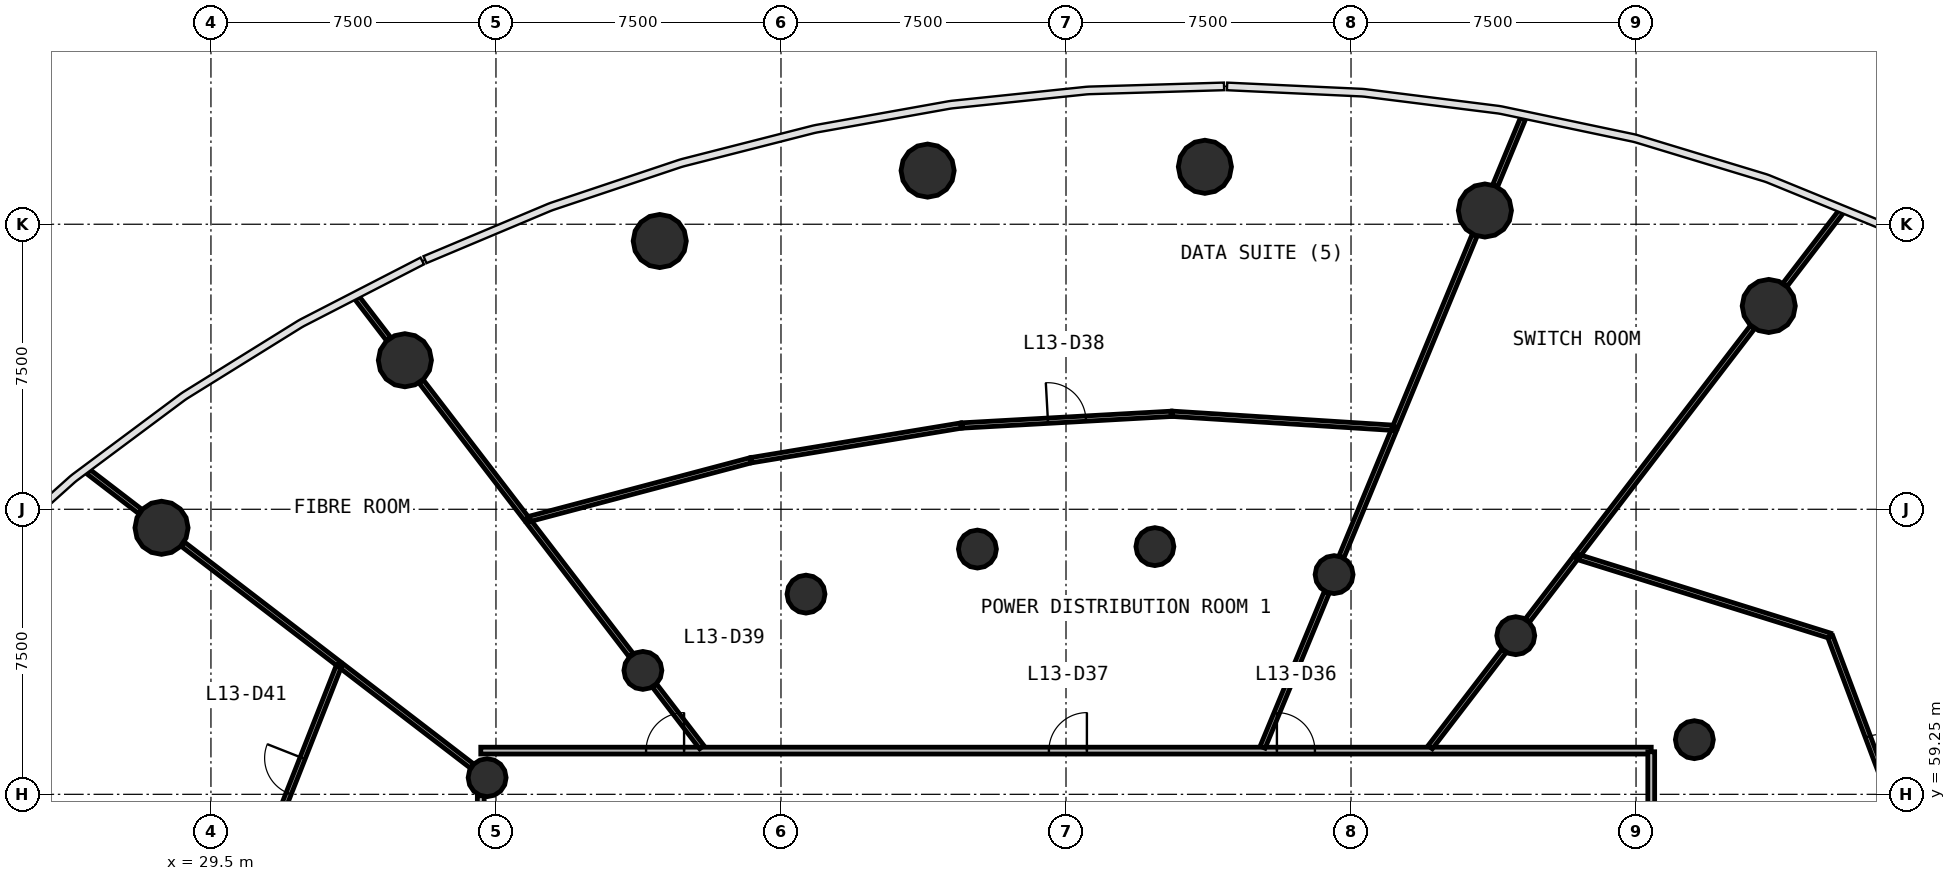
"""IFC4 building model, lengths in metres.
Left out: names, types, materials, properties, quantities, classifications, styles, units other than length and angle.
Written with IfcOpenShell. Run it as: python <this file> out.ifc"""

import sys

from ifc_helpers import new_model, si_unit, direction, frame, frame_2d, origin, origin_2d, place, context, subcontext, project, spatial, rectangle, circle, extrude, source, transform, mapped, element, fill, save


model = new_model("IFC4")
c1 = context("Model", 3, precision=1e-05, world=origin(), true_north=direction((0.0, 1.0)))
c2 = subcontext(c1, "Body", "Model", "MODEL_VIEW")
j1 = project(units=[si_unit("LENGTHUNIT", "METRE"), si_unit("PLANEANGLEUNIT", "RADIAN")], contexts=[c1])
p1 = place(None, origin())
s1 = spatial("IfcSite", under=j1, at=p1, CompositionType="ELEMENT")
p2 = place(p1, origin())
s2 = spatial("IfcBuilding", under=s1, at=p2, CompositionType="ELEMENT")
p3 = place(p2, frame((0.0, 0.0, 57.8)))
s3 = spatial("IfcBuildingStorey", under=s2, at=p3, CompositionType="ELEMENT", Elevation=57.8)
m1 = source(origin(), c2, "Body", "SweptSolid", [
    extrude(circle(Radius=0.7, at=origin_2d()), origin(), (0.0, 0.0, 1.0), 4.4),
])
for number, where, z_axis, x_axis in (
    (1, (70.492, 72.1, 0.0), (0.0, 0.0, 1.0), (1.0, 0.0, 0.0)),
    (2, (63.023, 74.611, 0.0), (0.0, 0.0, 1.0), (1.0, 0.0, 0.0)),
    (3, (55.655, 75.761, 0.0), (0.0, 0.0, 1.0), (1.0, 0.0, 0.0)),
    (4, (48.358, 75.661, 0.0), (0.0, 0.0, 1.0), (1.0, 0.0, 0.0)),
    (5, (41.31, 73.809, 0.0), (0.0, 0.0, 1.0), (1.0, 0.0, 0.0)),
    (6, (34.604, 70.672, 0.0), (0.0, 0.0, 1.0), (1.0, 0.0, 0.0)),
    (7, (28.199, 66.263, 0.0), (0.0, 0.0, 1.0), (1.0, 0.0, 0.0)),
):
    element("IfcColumn", number, at=place(p3, frame(where, z_axis=z_axis, x_axis=x_axis)), inside=s3, PredefinedType="COLUMN", context=c2, shape_type="MappedRepresentation", body=[
        mapped(m1, transform((0.0, 0.0, 0.0), scale=1.0)),
    ])
m2 = source(origin(), c2, "Body", "SweptSolid", [
    extrude(circle(Radius=0.5, at=origin_2d()), origin(), (0.0, 0.0, 1.0), 4.4),
])
for number, where, z_axis, x_axis in (
    (8, (68.535, 60.688, 0.0), (0.0, 0.0, 1.0), (1.0, 0.0, 0.0)),
    (9, (63.835, 63.424, 0.0), (0.0, 0.0, 1.0), (1.0, 0.0, 0.0)),
    (10, (59.055, 65.031, 0.0), (0.0, 0.0, 1.0), (1.0, 0.0, 0.0)),
    (11, (54.339, 65.767, 0.0), (0.0, 0.0, 1.0), (1.0, 0.0, 0.0)),
    (12, (49.669, 65.703, 0.0), (0.0, 0.0, 1.0), (1.0, 0.0, 0.0)),
    (13, (45.158, 64.518, 0.0), (0.0, 0.0, 1.0), (1.0, 0.0, 0.0)),
    (14, (40.866, 62.51, 0.0), (0.0, 0.0, 1.0), (1.0, 0.0, 0.0)),
    (15, (36.768, 59.688, 0.0), (0.0, 0.0, 1.0), (1.0, 0.0, 0.0)),
):
    element("IfcColumn", number, at=place(p3, frame(where, z_axis=z_axis, x_axis=x_axis)), inside=s3, PredefinedType="COLUMN", context=c2, shape_type="MappedRepresentation", body=[
        mapped(m2, transform((0.0, 0.0, 0.0), scale=1.0)),
    ])
p4 = place(p3, frame((36.6, 60.4, 0.0), z_axis=(0.0, 0.0, 1.0), x_axis=(1.0, 0.0, 0.0)))
e16 = element("IfcWall", 16, at=p4, inside=s3, PredefinedType="PARTITIONING", context=c2, shape_type="SweptSolid", body=[
    extrude(rectangle(XDim=30.8, YDim=0.18, at=frame_2d((15.4, 0.0))), origin(), (0.0, 0.0, 1.0), 3.05),
])
p5 = place(p4, frame((20.95, 0.0, 0.0)))
e17 = element("IfcOpeningElement", 17, at=p5, cuts=e16, PredefinedType="OPENING", context=c2, shape_type="SweptSolid", body=[
    extrude(rectangle(XDim=1.0, YDim=2.1, at=frame_2d((0.5, 1.05))), frame((0.0, 0.1, 0.0), z_axis=(0.0, -1.0, 0.0), x_axis=(1.0, 0.0, 0.0)), (0.0, 0.0, 1.0), 0.2),
])
p6 = place(p4, frame((14.95, 0.0, 0.0)))
e18 = element("IfcOpeningElement", 18, at=p6, cuts=e16, PredefinedType="OPENING", context=c2, shape_type="SweptSolid", body=[
    extrude(rectangle(XDim=1.0, YDim=2.1, at=frame_2d((0.5, 1.05))), frame((0.0, 0.1, 0.0), z_axis=(0.0, -1.0, 0.0), x_axis=(1.0, 0.0, 0.0)), (0.0, 0.0, 1.0), 0.2),
])
p7 = place(p4, frame((4.35, 0.0, 0.0)))
e19 = element("IfcOpeningElement", 19, at=p7, cuts=e16, PredefinedType="OPENING", context=c2, shape_type="SweptSolid", body=[
    extrude(rectangle(XDim=1.0, YDim=2.1, at=frame_2d((0.5, 1.05))), frame((0.0, 0.1, 0.0), z_axis=(0.0, -1.0, 0.0), x_axis=(1.0, 0.0, 0.0)), (0.0, 0.0, 1.0), 0.2),
])
p8 = place(p3, frame((67.4, 60.37, 0.0), z_axis=(0.0, 0.0, 1.0), x_axis=(0.0, -1.0, 0.0)))
e20 = element("IfcWall", 20, at=p8, inside=s3, PredefinedType="PARTITIONING", context=c2, shape_type="SweptSolid", body=[
    extrude(rectangle(XDim=23.583, YDim=0.18, at=frame_2d((11.791, 0.0))), origin(), (0.0, 0.0, 1.0), 3.05),
])
p9 = place(p8, frame((11.333, 0.0, 0.0)))
e21 = element("IfcOpeningElement", 21, at=p9, cuts=e20, PredefinedType="OPENING", context=c2, shape_type="SweptSolid", body=[
    extrude(rectangle(XDim=1.0, YDim=2.1, at=frame_2d((0.5, 1.05))), frame((0.0, 0.1, 0.0), z_axis=(0.0, -1.0, 0.0), x_axis=(1.0, 0.0, 0.0)), (0.0, 0.0, 1.0), 0.2),
])
p10 = place(p8, frame((4.532, 0.0, 0.0)))
e22 = element("IfcOpeningElement", 22, at=p10, cuts=e20, PredefinedType="OPENING", context=c2, shape_type="SweptSolid", body=[
    extrude(rectangle(XDim=1.0, YDim=2.1, at=frame_2d((0.5, 1.05))), frame((0.0, 0.1, 0.0), z_axis=(0.0, -1.0, 0.0), x_axis=(1.0, 0.0, 0.0)), (0.0, 0.0, 1.0), 0.2),
])
p11 = place(p3, frame((36.6, 35.63, 0.0), z_axis=(0.0, 0.0, 1.0), x_axis=(0.0, 1.0, 0.0)))
e23 = element("IfcWall", 23, at=p11, inside=s3, PredefinedType="PARTITIONING", context=c2, shape_type="SweptSolid", body=[
    extrude(rectangle(XDim=23.583, YDim=0.18, at=frame_2d((11.791, 0.0))), origin(), (0.0, 0.0, 1.0), 3.05),
])
p12 = place(p11, frame((11.333, 0.0, 0.0)))
e24 = element("IfcOpeningElement", 24, at=p12, cuts=e23, PredefinedType="OPENING", context=c2, shape_type="SweptSolid", body=[
    extrude(rectangle(XDim=1.0, YDim=2.1, at=frame_2d((0.5, 1.05))), frame((0.0, 0.1, 0.0), z_axis=(0.0, -1.0, 0.0), x_axis=(1.0, 0.0, 0.0)), (0.0, 0.0, 1.0), 0.2),
])
p13 = place(p11, frame((9.133, 0.0, 0.0)))
e25 = element("IfcOpeningElement", 25, at=p13, cuts=e23, PredefinedType="OPENING", context=c2, shape_type="SweptSolid", body=[
    extrude(rectangle(XDim=1.0, YDim=2.1, at=frame_2d((0.5, 1.05))), frame((0.0, 0.1, 0.0), z_axis=(0.0, -1.0, 0.0), x_axis=(1.0, 0.0, 0.0)), (0.0, 0.0, 1.0), 0.2),
])
p14 = place(p3, frame((65.433, 65.507, 0.0), z_axis=(0.0, 0.0, 1.0), x_axis=(0.608761001487, 0.79335366834, 0.0)))
e26 = element("IfcWall", 26, at=p14, inside=s3, PredefinedType="PARTITIONING", context=c2, shape_type="SweptSolid", body=[
    extrude(rectangle(XDim=7.606, YDim=0.14, at=frame_2d((3.803, 0.0))), origin(), (0.0, 0.0, 1.0), 3.05),
])
p15 = place(p3, frame((72.101, 63.424, 0.0), z_axis=(0.0, 0.0, 1.0), x_axis=(-0.954540929829, 0.298079877351, 0.0)))
e27 = element("IfcWall", 27, at=p15, inside=s3, PredefinedType="PARTITIONING", context=c2, shape_type="SweptSolid", body=[
    extrude(rectangle(XDim=6.911, YDim=0.14, at=frame_2d((3.456, 0.0))), origin(), (0.0, 0.0, 1.0), 3.05),
])
p16 = place(p3, frame((72.112, 63.396, 0.0), z_axis=(0.0, 0.0, 1.0), x_axis=(0.351475385959, -0.936197122974, 0.0)))
e28 = element("IfcWall", 28, at=p16, inside=s3, PredefinedType="PARTITIONING", context=c2, shape_type="SweptSolid", body=[
    extrude(rectangle(XDim=6.461, YDim=0.14, at=frame_2d((3.231, 0.0))), origin(), (0.0, 0.0, 1.0), 3.05),
])
p17 = place(p16, frame((2.811, 0.0, 0.0)))
e29 = element("IfcOpeningElement", 29, at=p17, cuts=e28, PredefinedType="OPENING", context=c2, shape_type="SweptSolid", body=[
    extrude(rectangle(XDim=1.0, YDim=2.1, at=frame_2d((0.5, 1.05))), frame((0.0, 0.08, 0.0), z_axis=(0.0, -1.0, 0.0), x_axis=(1.0, 0.0, 0.0)), (0.0, 0.0, 1.0), 0.16),
])
p18 = place(p3, frame((30.597, 56.865, 0.0), z_axis=(0.0, 0.0, 1.0), x_axis=(0.36659433638, 0.930380885731, 0.0)))
e30 = element("IfcWall", 30, at=p18, inside=s3, PredefinedType="PARTITIONING", context=c2, shape_type="SweptSolid", body=[
    extrude(rectangle(XDim=6.238, YDim=0.14, at=frame_2d((3.119, 0.0))), origin(), (0.0, 0.0, 1.0), 3.05),
])
p19 = place(p18, frame((2.587, 0.0, 0.0)))
e31 = element("IfcOpeningElement", 31, at=p19, cuts=e30, PredefinedType="OPENING", context=c2, shape_type="SweptSolid", body=[
    extrude(rectangle(XDim=1.0, YDim=2.1, at=frame_2d((0.5, 1.05))), frame((0.0, 0.08, 0.0), z_axis=(0.0, -1.0, 0.0), x_axis=(1.0, 0.0, 0.0)), (0.0, 0.0, 1.0), 0.16),
])
p20 = place(p3, frame((43.7, 68.038, 0.0), z_axis=(0.0, 0.0, 1.0), x_axis=(-0.966620202726, -0.256213550932, 0.0)))
e32 = element("IfcWall", 32, at=p20, inside=s3, PredefinedType="PARTITIONING", context=c2, shape_type="SweptSolid", body=[
    extrude(rectangle(XDim=6.083, YDim=0.14, at=frame_2d((3.042, 0.0))), origin(), (0.0, 0.0, 1.0), 3.05),
])
p21 = place(p3, frame((60.654, 68.891, 0.0), z_axis=(0.0, 0.0, 1.0), x_axis=(-0.997994335937, 0.063303281411, 0.0)))
e33 = element("IfcWall", 33, at=p21, inside=s3, PredefinedType="PARTITIONING", context=c2, shape_type="SweptSolid", body=[
    extrude(rectangle(XDim=5.866, YDim=0.14, at=frame_2d((2.933, 0.0))), origin(), (0.0, 0.0, 1.0), 3.05),
])
p22 = place(p3, frame((49.241, 68.953, 0.0), z_axis=(0.0, 0.0, 1.0), x_axis=(-0.986639663996, -0.162917689125, 0.0)))
e34 = element("IfcWall", 34, at=p22, inside=s3, PredefinedType="PARTITIONING", context=c2, shape_type="SweptSolid", body=[
    extrude(rectangle(XDim=5.587, YDim=0.14, at=frame_2d((2.793, 0.0))), origin(), (0.0, 0.0, 1.0), 3.05),
])
p23 = place(p3, frame((49.271, 68.955, 0.0), z_axis=(0.0, 0.0, 1.0), x_axis=(0.998453114177, 0.055600168976, 0.0)))
e35 = element("IfcWall", 35, at=p23, inside=s3, PredefinedType="PARTITIONING", context=c2, shape_type="SweptSolid", body=[
    extrude(rectangle(XDim=5.506, YDim=0.14, at=frame_2d((2.753, 0.0))), origin(), (0.0, 0.0, 1.0), 3.05),
])
p24 = place(p23, frame((2.257, 0.0, 0.0)))
e36 = element("IfcOpeningElement", 36, at=p24, cuts=e35, PredefinedType="OPENING", context=c2, shape_type="SweptSolid", body=[
    extrude(rectangle(XDim=1.0, YDim=2.1, at=frame_2d((0.5, 1.05))), frame((0.0, 0.08, 0.0), z_axis=(0.0, -1.0, 0.0), x_axis=(1.0, 0.0, 0.0)), (0.0, 0.0, 1.0), 0.16),
])
p25 = place(p3, frame((60.665, 68.919, 0.0), z_axis=(0.0, 0.0, 1.0), x_axis=(0.382679771888, 0.923881048722, 0.0)))
e37 = element("IfcWall", 37, at=p25, inside=s3, PredefinedType="PARTITIONING", context=c2, shape_type="SweptSolid", body=[
    extrude(rectangle(XDim=5.457, YDim=0.14, at=frame_2d((2.728, 0.0))), origin(), (0.0, 0.0, 1.0), 3.05),
])
p26 = place(p3, frame((32.86, 62.687, 0.0), z_axis=(0.0, 0.0, 1.0), x_axis=(-0.793372969887, 0.608735846367, 0.0)))
e38 = element("IfcWall", 38, at=p26, inside=s3, PredefinedType="PARTITIONING", context=c2, shape_type="SweptSolid", body=[
    extrude(rectangle(XDim=5.17, YDim=0.14, at=frame_2d((2.585, 0.0))), origin(), (0.0, 0.0, 1.0), 3.05),
])
p27 = place(p3, frame((37.802, 66.504, 0.0), z_axis=(0.0, 0.0, 1.0), x_axis=(-0.608789725695, 0.793331626679, 0.0)))
e39 = element("IfcWall", 39, at=p27, inside=s3, PredefinedType="PARTITIONING", context=c2, shape_type="SweptSolid", body=[
    extrude(rectangle(XDim=4.55, YDim=0.14, at=frame_2d((2.275, 0.0))), origin(), (0.0, 0.0, 1.0), 3.05),
])
p28 = place(p3, frame((57.174, 60.49, 0.0), z_axis=(0.0, 0.0, 1.0), x_axis=(0.382672831764, 0.923883923353, 0.0)))
e40 = element("IfcWall", 40, at=p28, inside=s3, PredefinedType="PARTITIONING", context=c2, shape_type="SweptSolid", body=[
    extrude(rectangle(XDim=4.41, YDim=0.14, at=frame_2d((2.205, 0.0))), origin(), (0.0, 0.0, 1.0), 3.05),
])
p29 = place(p3, frame((40.559, 62.91, 0.0), z_axis=(0.0, 0.0, 1.0), x_axis=(-0.608750123595, 0.793362015112, 0.0)))
e41 = element("IfcWall", 41, at=p29, inside=s3, PredefinedType="PARTITIONING", context=c2, shape_type="SweptSolid", body=[
    extrude(rectangle(XDim=4.424, YDim=0.14, at=frame_2d((2.212, 0.0))), origin(), (0.0, 0.0, 1.0), 3.05),
])
p30 = place(p3, frame((36.367, 59.995, 0.0), z_axis=(0.0, 0.0, 1.0), x_axis=(-0.793350599557, 0.608765000786, 0.0)))
e42 = element("IfcWall", 42, at=p30, inside=s3, PredefinedType="PARTITIONING", context=c2, shape_type="SweptSolid", body=[
    extrude(rectangle(XDim=4.318, YDim=0.14, at=frame_2d((2.159, 0.0))), origin(), (0.0, 0.0, 1.0), 3.05),
])
p31 = place(p3, frame((59.248, 65.498, 0.0), z_axis=(0.0, 0.0, 1.0), x_axis=(0.382707244595, 0.923869668803, 0.0)))
e43 = element("IfcWall", 43, at=p31, inside=s3, PredefinedType="PARTITIONING", context=c2, shape_type="SweptSolid", body=[
    extrude(rectangle(XDim=3.599, YDim=0.14, at=frame_2d((1.8, 0.0))), origin(), (0.0, 0.0, 1.0), 3.05),
])
p32 = place(p3, frame((61.584, 60.49, 0.0), z_axis=(0.0, 0.0, 1.0), x_axis=(0.60874605662, 0.793365135703, 0.0)))
e44 = element("IfcWall", 44, at=p32, inside=s3, PredefinedType="PARTITIONING", context=c2, shape_type="SweptSolid", body=[
    extrude(rectangle(XDim=3.194, YDim=0.14, at=frame_2d((1.597, 0.0))), origin(), (0.0, 0.0, 1.0), 3.05),
])
p33 = place(p3, frame((70.921, 72.658, 0.0), z_axis=(0.0, 0.0, 1.0), x_axis=(0.608826142, 0.793303680073, 0.0)))
e45 = element("IfcWall", 45, at=p33, inside=s3, PredefinedType="PARTITIONING", context=c2, shape_type="SweptSolid", body=[
    extrude(rectangle(XDim=2.428, YDim=0.14, at=frame_2d((1.214, 0.0))), origin(), (0.0, 0.0, 1.0), 3.05),
])
p34 = place(p3, frame((42.416, 60.49, 0.0), z_axis=(0.0, 0.0, 1.0), x_axis=(-0.608727763541, 0.793379171578, 0.0)))
e46 = element("IfcWall", 46, at=p34, inside=s3, PredefinedType="PARTITIONING", context=c2, shape_type="SweptSolid", body=[
    extrude(rectangle(XDim=2.042, YDim=0.14, at=frame_2d((1.021, 0.0))), origin(), (0.0, 0.0, 1.0), 3.05),
])
p35 = place(p3, frame((64.142, 63.824, 0.0), z_axis=(0.0, 0.0, 1.0), x_axis=(0.608762392913, 0.793352600661, 0.0)))
e47 = element("IfcWall", 47, at=p35, inside=s3, PredefinedType="PARTITIONING", context=c2, shape_type="SweptSolid", body=[
    extrude(rectangle(XDim=2.091, YDim=0.14, at=frame_2d((1.045, 0.0))), origin(), (0.0, 0.0, 1.0), 3.05),
])
p36 = place(p3, frame((63.292, 75.263, 0.0), z_axis=(0.0, 0.0, 1.0), x_axis=(0.382669186211, 0.923885433333, 0.0)))
e48 = element("IfcWall", 48, at=p36, inside=s3, PredefinedType="PARTITIONING", context=c2, shape_type="SweptSolid", body=[
    extrude(rectangle(XDim=1.925, YDim=0.14, at=frame_2d((0.962, 0.0))), origin(), (0.0, 0.0, 1.0), 3.05),
])
p37 = place(p3, frame((27.641, 66.691, 0.0), z_axis=(0.0, 0.0, 1.0), x_axis=(-0.793288592826, 0.608845800258, 0.0)))
e49 = element("IfcWall", 49, at=p37, inside=s3, PredefinedType="PARTITIONING", context=c2, shape_type="SweptSolid", body=[
    extrude(rectangle(XDim=1.719, YDim=0.14, at=frame_2d((0.86, 0.0))), origin(), (0.0, 0.0, 1.0), 3.05),
])
p38 = place(p3, frame((34.175, 71.23, 0.0), z_axis=(0.0, 0.0, 1.0), x_axis=(-0.608933775349, 0.793221064546, 0.0)))
e50 = element("IfcWall", 50, at=p38, inside=s3, PredefinedType="PARTITIONING", context=c2, shape_type="SweptSolid", body=[
    extrude(rectangle(XDim=1.367, YDim=0.14, at=frame_2d((0.684, 0.0))), origin(), (0.0, 0.0, 1.0), 3.05),
])
m3 = source(origin(), c2, "Body", "SweptSolid", [
    extrude(rectangle(XDim=1.0, YDim=2.1, at=frame_2d((0.5, 1.05))), frame((0.0, 0.025, 0.0), z_axis=(0.0, -1.0, 0.0), x_axis=(1.0, 0.0, 0.0)), (0.0, 0.0, 1.0), 0.05),
])
p39 = place(p17, origin())
e51 = element("IfcDoor", 51, at=p39, inside=s3, OperationType="SINGLE_SWING_RIGHT", PredefinedType="DOOR", context=c2, shape_type="MappedRepresentation", body=[
    mapped(m3, transform((0.0, 0.0, 0.0), scale=1.0)),
])
fill(e29, e51)
p40 = place(p5, origin())
e52 = element("IfcDoor", 52, at=p40, inside=s3, OperationType="SINGLE_SWING_LEFT", PredefinedType="DOOR", context=c2, shape_type="MappedRepresentation", body=[
    mapped(m3, transform((0.0, 0.0, 0.0), scale=1.0)),
])
fill(e17, e52)
p41 = place(p6, origin())
e53 = element("IfcDoor", 53, at=p41, inside=s3, OperationType="SINGLE_SWING_RIGHT", PredefinedType="DOOR", context=c2, shape_type="MappedRepresentation", body=[
    mapped(m3, transform((0.0, 0.0, 0.0), scale=1.0)),
])
fill(e18, e53)
p42 = place(p24, origin())
e54 = element("IfcDoor", 54, at=p42, inside=s3, OperationType="SINGLE_SWING_LEFT", PredefinedType="DOOR", context=c2, shape_type="MappedRepresentation", body=[
    mapped(m3, transform((0.0, 0.0, 0.0), scale=1.0)),
])
fill(e36, e54)
p43 = place(p7, origin())
e55 = element("IfcDoor", 55, at=p43, inside=s3, OperationType="SINGLE_SWING_RIGHT", PredefinedType="DOOR", context=c2, shape_type="MappedRepresentation", body=[
    mapped(m3, transform((0.0, 0.0, 0.0), scale=1.0)),
])
fill(e19, e55)
p44 = place(p19, origin())
e56 = element("IfcDoor", 56, at=p44, inside=s3, OperationType="SINGLE_SWING_RIGHT", PredefinedType="DOOR", context=c2, shape_type="MappedRepresentation", body=[
    mapped(m3, transform((0.0, 0.0, 0.0), scale=1.0)),
])
fill(e31, e56)
save(model, sys.argv[1])
